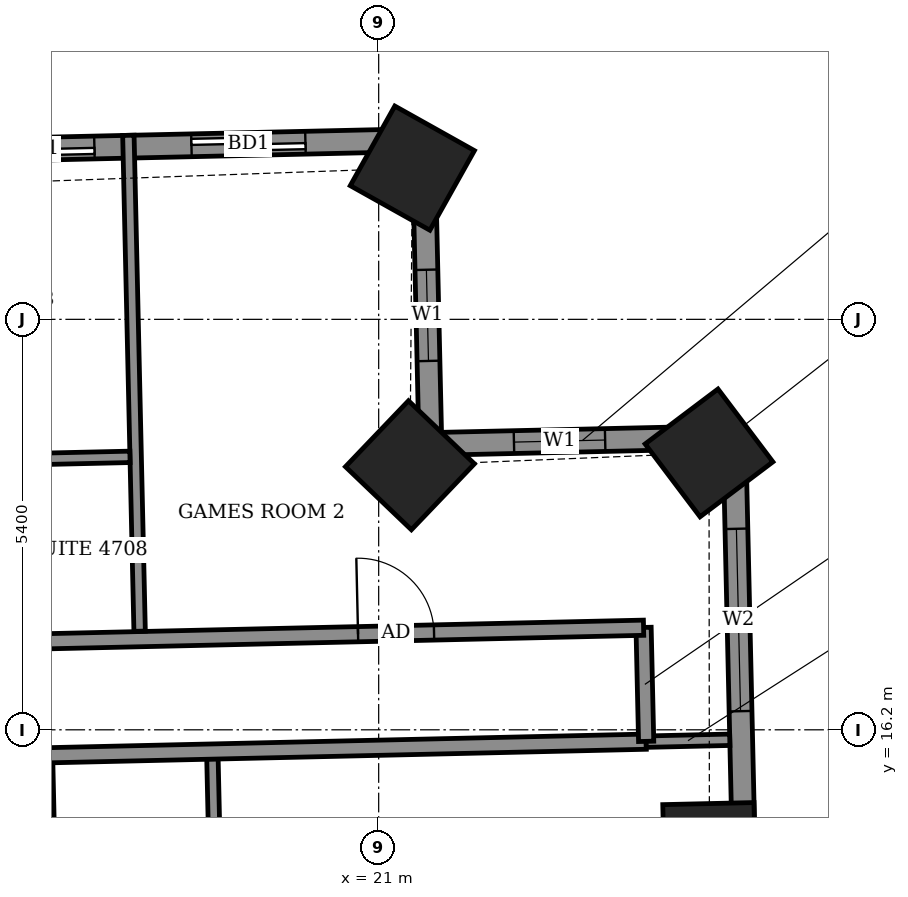
"""IFC4 building model, lengths in metres.
Left out: names, types, materials, properties, quantities, classifications, styles, units other than length and angle.
Written with IfcOpenShell. Run it as: python <this file> out.ifc"""

import sys

from ifc_helpers import new_model, si_unit, direction, frame, frame_2d, origin, origin_2d, place, context, subcontext, project, spatial, rectangle, extrude, element, fill, save


model = new_model("IFC4")
c1 = context("Model", 3, precision=1e-05, world=origin(), true_north=direction((0.0, 1.0)))
c2 = subcontext(c1, "Body", "Model", "MODEL_VIEW")
j1 = project(units=[si_unit("LENGTHUNIT", "METRE"), si_unit("PLANEANGLEUNIT", "RADIAN")], contexts=[c1])
p1 = place(None, origin())
s1 = spatial("IfcSite", under=j1, at=p1, CompositionType="ELEMENT")
p2 = place(p1, origin())
s2 = spatial("IfcBuilding", under=s1, at=p2, CompositionType="ELEMENT")
p3 = place(p2, frame((0.0, 0.0, 186.1)))
s3 = spatial("IfcBuildingStorey", under=s2, at=p3, CompositionType="ELEMENT", Elevation=186.1)
for number, where, z_axis, x_axis in (
    (1, (25.351, 14.629, -0.55), (0.0, 0.0, 1.0), (-0.023, 1.0, 0.0)),
    (2, (25.346, 19.843, -0.55), (0.0, 0.0, 1.0), (-0.602, 0.798, 0.0)),
    (3, (21.411, 19.68, -0.55), (0.0, 0.0, 1.0), (-0.723, 0.691, 0.0)),
    (4, (21.443, 23.589, -0.55), (0.0, 0.0, 1.0), (-0.873, 0.488, 0.0)),
):
    element("IfcColumn", number, at=place(p3, frame(where, z_axis=z_axis, x_axis=x_axis)), inside=s3, PredefinedType="COLUMN", context=c2, shape_type="SweptSolid", body=[
        extrude(rectangle(XDim=1.2, YDim=1.2, at=origin_2d()), origin(), (0.0, 0.0, 1.0), 3.6),
    ])
p4 = place(p3, frame((25.929, 9.025, 0.0), z_axis=(0.0, 0.0, 1.0), x_axis=(-0.022667601583, 0.999743056909, 0.0)))
e5 = element("IfcWall", 5, at=p4, inside=s3, PredefinedType="SOLIDWALL", context=c2, shape_type="SweptSolid", body=[
    extrude(rectangle(XDim=11.029, YDim=0.3, at=frame_2d((5.515, 0.0))), origin(), (0.0, 0.0, 1.0), 3.05),
])
p5 = place(p4, frame((0.833, 0.0, 0.0)))
e6 = element("IfcOpeningElement", 6, at=p5, cuts=e5, PredefinedType="OPENING", context=c2, shape_type="SweptSolid", body=[
    extrude(rectangle(XDim=1.5, YDim=2.4, at=frame_2d((0.75, 1.2))), frame((0.0, 0.16, 0.0), z_axis=(0.0, -1.0, 0.0), x_axis=(1.0, 0.0, 0.0)), (0.0, 0.0, 1.0), 0.32),
])
p6 = place(p4, frame((3.389, 0.0, 0.9)))
e7 = element("IfcOpeningElement", 7, at=p6, cuts=e5, PredefinedType="OPENING", context=c2, shape_type="SweptSolid", body=[
    extrude(rectangle(XDim=1.2, YDim=1.5, at=frame_2d((0.6, 0.75))), frame((0.0, 0.16, 0.0), z_axis=(0.0, -1.0, 0.0), x_axis=(1.0, 0.0, 0.0)), (0.0, 0.0, 1.0), 0.32),
])
p7 = place(p4, frame((7.422, 0.0, 0.9)))
e8 = element("IfcOpeningElement", 8, at=p7, cuts=e5, PredefinedType="OPENING", context=c2, shape_type="SweptSolid", body=[
    extrude(rectangle(XDim=2.4, YDim=1.5, at=frame_2d((1.2, 0.75))), frame((0.0, 0.16, 0.0), z_axis=(0.0, -1.0, 0.0), x_axis=(1.0, 0.0, 0.0)), (0.0, 0.0, 1.0), 0.32),
])
p8 = place(p3, frame((25.679, 20.051, 0.0), z_axis=(0.0, 0.0, 1.0), x_axis=(-0.999740826251, -0.022765770952, 0.0)))
e9 = element("IfcWall", 9, at=p8, inside=s3, PredefinedType="SOLIDWALL", context=c2, shape_type="SweptSolid", body=[
    extrude(rectangle(XDim=4.0, YDim=0.3, at=frame_2d((2.0, 0.0))), origin(), (0.0, 0.0, 1.0), 2.55),
])
p9 = place(p8, frame((1.7, 0.0, 0.9)))
e10 = element("IfcOpeningElement", 10, at=p9, cuts=e9, PredefinedType="OPENING", context=c2, shape_type="SweptSolid", body=[
    extrude(rectangle(XDim=1.2, YDim=1.5, at=frame_2d((0.6, 0.75))), frame((0.0, 0.16, 0.0), z_axis=(0.0, -1.0, 0.0), x_axis=(1.0, 0.0, 0.0)), (0.0, 0.0, 1.0), 0.32),
])
p10 = place(p3, frame((21.68, 19.96, 0.0), z_axis=(0.0, 0.0, 1.0), x_axis=(-0.022704768219, 0.999742213523, 0.0)))
e11 = element("IfcWall", 11, at=p10, inside=s3, PredefinedType="SOLIDWALL", context=c2, shape_type="SweptSolid", body=[
    extrude(rectangle(XDim=4.0, YDim=0.3, at=frame_2d((2.0, 0.0))), origin(), (0.0, 0.0, 1.0), 2.55),
])
p11 = place(p10, frame((1.093, 0.0, 0.9)))
e12 = element("IfcOpeningElement", 12, at=p11, cuts=e11, PredefinedType="OPENING", context=c2, shape_type="SweptSolid", body=[
    extrude(rectangle(XDim=1.2, YDim=1.5, at=frame_2d((0.6, 0.75))), frame((0.0, 0.16, 0.0), z_axis=(0.0, -1.0, 0.0), x_axis=(1.0, 0.0, 0.0)), (0.0, 0.0, 1.0), 0.32),
])
p12 = place(p3, frame((21.589, 23.959, 0.0), z_axis=(0.0, 0.0, 1.0), x_axis=(-0.999742671382, -0.022684598702, 0.0)))
e13 = element("IfcWall", 13, at=p12, inside=s3, PredefinedType="SOLIDWALL", context=c2, shape_type="SweptSolid", body=[
    extrude(rectangle(XDim=40.381, YDim=0.3, at=frame_2d((20.19, 0.0))), origin(), (0.0, 0.0, 1.0), 3.05),
])
p13 = place(p12, frame((1.553, 0.0, 0.0)))
e14 = element("IfcOpeningElement", 14, at=p13, cuts=e13, PredefinedType="OPENING", context=c2, shape_type="SweptSolid", body=[
    extrude(rectangle(XDim=1.5, YDim=2.4, at=frame_2d((0.75, 1.2))), frame((0.0, 0.16, 0.0), z_axis=(0.0, -1.0, 0.0), x_axis=(1.0, 0.0, 0.0)), (0.0, 0.0, 1.0), 0.32),
])
p14 = place(p12, frame((4.33, 0.0, 0.0)))
e15 = element("IfcOpeningElement", 15, at=p14, cuts=e13, PredefinedType="OPENING", context=c2, shape_type="SweptSolid", body=[
    extrude(rectangle(XDim=1.5, YDim=2.4, at=frame_2d((0.75, 1.2))), frame((0.0, 0.16, 0.0), z_axis=(0.0, -1.0, 0.0), x_axis=(1.0, 0.0, 0.0)), (0.0, 0.0, 1.0), 0.32),
])
p15 = place(p12, frame((9.43, 0.0, 0.0)))
e16 = element("IfcOpeningElement", 16, at=p15, cuts=e13, PredefinedType="OPENING", context=c2, shape_type="SweptSolid", body=[
    extrude(rectangle(XDim=1.5, YDim=2.4, at=frame_2d((0.75, 1.2))), frame((0.0, 0.16, 0.0), z_axis=(0.0, -1.0, 0.0), x_axis=(1.0, 0.0, 0.0)), (0.0, 0.0, 1.0), 0.32),
])
p16 = place(p12, frame((14.37, 0.0, 0.0)))
e17 = element("IfcOpeningElement", 17, at=p16, cuts=e13, PredefinedType="OPENING", context=c2, shape_type="SweptSolid", body=[
    extrude(rectangle(XDim=1.5, YDim=2.4, at=frame_2d((0.75, 1.2))), frame((0.0, 0.16, 0.0), z_axis=(0.0, -1.0, 0.0), x_axis=(1.0, 0.0, 0.0)), (0.0, 0.0, 1.0), 0.32),
])
p17 = place(p12, frame((17.41, 0.0, 0.0)))
e18 = element("IfcOpeningElement", 18, at=p17, cuts=e13, PredefinedType="OPENING", context=c2, shape_type="SweptSolid", body=[
    extrude(rectangle(XDim=1.5, YDim=2.4, at=frame_2d((0.75, 1.2))), frame((0.0, 0.16, 0.0), z_axis=(0.0, -1.0, 0.0), x_axis=(1.0, 0.0, 0.0)), (0.0, 0.0, 1.0), 0.32),
])
p18 = place(p12, frame((22.03, 0.0, 0.0)))
e19 = element("IfcOpeningElement", 19, at=p18, cuts=e13, PredefinedType="OPENING", context=c2, shape_type="SweptSolid", body=[
    extrude(rectangle(XDim=1.5, YDim=2.4, at=frame_2d((0.75, 1.2))), frame((0.0, 0.16, 0.0), z_axis=(0.0, -1.0, 0.0), x_axis=(1.0, 0.0, 0.0)), (0.0, 0.0, 1.0), 0.32),
])
p19 = place(p12, frame((27.7, 0.0, 0.0)))
e20 = element("IfcOpeningElement", 20, at=p19, cuts=e13, PredefinedType="OPENING", context=c2, shape_type="SweptSolid", body=[
    extrude(rectangle(XDim=1.2, YDim=2.4, at=frame_2d((0.6, 1.2))), frame((0.0, 0.16, 0.0), z_axis=(0.0, -1.0, 0.0), x_axis=(1.0, 0.0, 0.0)), (0.0, 0.0, 1.0), 0.32),
])
p20 = place(p12, frame((30.48, 0.0, 0.0)))
e21 = element("IfcOpeningElement", 21, at=p20, cuts=e13, PredefinedType="OPENING", context=c2, shape_type="SweptSolid", body=[
    extrude(rectangle(XDim=1.5, YDim=2.4, at=frame_2d((0.75, 1.2))), frame((0.0, 0.16, 0.0), z_axis=(0.0, -1.0, 0.0), x_axis=(1.0, 0.0, 0.0)), (0.0, 0.0, 1.0), 0.32),
])
p21 = place(p12, frame((35.065, 0.0, 0.0)))
e22 = element("IfcOpeningElement", 22, at=p21, cuts=e13, PredefinedType="OPENING", context=c2, shape_type="SweptSolid", body=[
    extrude(rectangle(XDim=1.5, YDim=2.4, at=frame_2d((0.75, 1.2))), frame((0.0, 0.16, 0.0), z_axis=(0.0, -1.0, 0.0), x_axis=(1.0, 0.0, 0.0)), (0.0, 0.0, 1.0), 0.32),
])
p22 = place(p12, frame((37.945, 0.0, 0.9)))
e23 = element("IfcOpeningElement", 23, at=p22, cuts=e13, PredefinedType="OPENING", context=c2, shape_type="SweptSolid", body=[
    extrude(rectangle(XDim=1.2, YDim=1.5, at=frame_2d((0.6, 0.75))), frame((0.0, 0.16, 0.0), z_axis=(0.0, -1.0, 0.0), x_axis=(1.0, 0.0, 0.0)), (0.0, 0.0, 1.0), 0.32),
])
p23 = place(p3, frame((16.797, 7.674, 0.0), z_axis=(0.0, 0.0, 1.0), x_axis=(-0.022698399288, 0.999742358145, 0.0)))
e24 = element("IfcWall", 24, at=p23, inside=s3, PredefinedType="PARTITIONING", context=c2, shape_type="SweptSolid", body=[
    extrude(rectangle(XDim=8.196, YDim=0.2, at=frame_2d((4.098, 0.0))), origin(), (0.0, 0.0, 1.0), 3.05),
])
p24 = place(p23, frame((1.539, 0.0, 0.0)))
e25 = element("IfcOpeningElement", 25, at=p24, cuts=e24, PredefinedType="OPENING", context=c2, shape_type="SweptSolid", body=[
    extrude(rectangle(XDim=1.0, YDim=2.1, at=frame_2d((0.5, 1.05))), frame((0.0, 0.11, 0.0), z_axis=(0.0, -1.0, 0.0), x_axis=(1.0, 0.0, 0.0)), (0.0, 0.0, 1.0), 0.22),
])
p25 = place(p23, frame((4.35, 0.0, 0.0)))
e26 = element("IfcOpeningElement", 26, at=p25, cuts=e24, PredefinedType="OPENING", context=c2, shape_type="SweptSolid", body=[
    extrude(rectangle(XDim=1.0, YDim=2.1, at=frame_2d((0.5, 1.05))), frame((0.0, 0.11, 0.0), z_axis=(0.0, -1.0, 0.0), x_axis=(1.0, 0.0, 0.0)), (0.0, 0.0, 1.0), 0.22),
])
p26 = place(p23, frame((6.546, 0.0, 0.0)))
e27 = element("IfcOpeningElement", 27, at=p26, cuts=e24, PredefinedType="OPENING", context=c2, shape_type="SweptSolid", body=[
    extrude(rectangle(XDim=0.9, YDim=2.1, at=frame_2d((0.45, 1.05))), frame((0.0, 0.11, 0.0), z_axis=(0.0, -1.0, 0.0), x_axis=(1.0, 0.0, 0.0)), (0.0, 0.0, 1.0), 0.22),
])
p27 = place(p3, frame((18.865, 13.519, 0.0), z_axis=(0.0, 0.0, 1.0), x_axis=(-0.022612884682, 0.999744296031, 0.0)))
e28 = element("IfcWall", 28, at=p27, inside=s3, PredefinedType="PARTITIONING", context=c2, shape_type="SweptSolid", body=[
    extrude(rectangle(XDim=2.3, YDim=0.15, at=frame_2d((1.15, 0.0))), origin(), (0.0, 0.0, 1.0), 3.05),
])
p28 = place(p3, frame((16.612, 15.864, 0.0), z_axis=(0.0, 0.0, 1.0), x_axis=(0.999741181744, 0.022750154412, 0.0)))
e29 = element("IfcWall", 29, at=p28, inside=s3, PredefinedType="PARTITIONING", context=c2, shape_type="SweptSolid", body=[
    extrude(rectangle(XDim=7.909, YDim=0.2, at=frame_2d((3.955, 0.0))), origin(), (0.0, 0.0, 1.0), 3.05),
])
p29 = place(p3, frame((24.519, 16.044, 0.0), z_axis=(0.0, 0.0, 1.0), x_axis=(0.999738732953, 0.022857511541, 0.0)))
e30 = element("IfcWall", 30, at=p29, inside=s3, PredefinedType="PARTITIONING", context=c2, shape_type="SweptSolid", body=[
    extrude(rectangle(XDim=1.1, YDim=0.15, at=frame_2d((0.55, 0.0))), origin(), (0.0, 0.0, 1.0), 2.55),
])
p30 = place(p3, frame((24.519, 16.048, 0.0), z_axis=(0.0, 0.0, 1.0), x_axis=(-0.022632637625, 0.99974384905, 0.0)))
e31 = element("IfcWall", 31, at=p30, inside=s3, PredefinedType="PARTITIONING", context=c2, shape_type="SweptSolid", body=[
    extrude(rectangle(XDim=1.5, YDim=0.2, at=frame_2d((0.75, 0.0))), origin(), (0.0, 0.0, 1.0), 3.05),
])
p31 = place(p3, frame((14.88, 17.325, 0.0), z_axis=(0.0, 0.0, 1.0), x_axis=(0.999742504166, 0.022691966963, 0.0)))
e32 = element("IfcWall", 32, at=p31, inside=s3, PredefinedType="PARTITIONING", context=c2, shape_type="SweptSolid", body=[
    extrude(rectangle(XDim=9.608, YDim=0.2, at=frame_2d((4.804, 0.0))), origin(), (0.0, 0.0, 1.0), 3.05),
])
p32 = place(p31, frame((5.85, 0.0, 0.0)))
e33 = element("IfcOpeningElement", 33, at=p32, cuts=e32, PredefinedType="OPENING", context=c2, shape_type="SweptSolid", body=[
    extrude(rectangle(XDim=1.0, YDim=2.1, at=frame_2d((0.5, 1.05))), frame((0.0, 0.11, 0.0), z_axis=(0.0, -1.0, 0.0), x_axis=(1.0, 0.0, 0.0)), (0.0, 0.0, 1.0), 0.22),
])
p33 = place(p3, frame((17.855, 17.497, 0.0), z_axis=(0.0, 0.0, 1.0), x_axis=(-0.022672114006, 0.999742954587, 0.0)))
e34 = element("IfcWall", 34, at=p33, inside=s3, PredefinedType="PARTITIONING", context=c2, shape_type="SweptSolid", body=[
    extrude(rectangle(XDim=6.526, YDim=0.15, at=frame_2d((3.263, 0.0))), origin(), (0.0, 0.0, 1.0), 2.55),
])
p34 = place(p3, frame((15.403, 19.738, 0.0), z_axis=(0.0, 0.0, 1.0), x_axis=(0.999740478815, 0.022781023197, 0.0)))
e35 = element("IfcWall", 35, at=p34, inside=s3, PredefinedType="PARTITIONING", context=c2, shape_type="SweptSolid", body=[
    extrude(rectangle(XDim=2.325, YDim=0.15, at=frame_2d((1.163, 0.0))), origin(), (0.0, 0.0, 1.0), 3.05),
])
p35 = place(p7, origin())
e36 = element("IfcWindow", 36, at=p35, inside=s3, PartitioningType="DOUBLE_PANEL_VERTICAL", PredefinedType="WINDOW", context=c2, shape_type="SweptSolid", body=[
    extrude(rectangle(XDim=2.4, YDim=1.5, at=frame_2d((1.2, 0.75))), frame((0.0, 0.03, 0.0), z_axis=(0.0, -1.0, 0.0), x_axis=(1.0, 0.0, 0.0)), (0.0, 0.0, 1.0), 0.06),
])
fill(e8, e36)
p36 = place(p9, origin())
e37 = element("IfcWindow", 37, at=p36, inside=s3, PartitioningType="SINGLE_PANEL", PredefinedType="WINDOW", context=c2, shape_type="SweptSolid", body=[
    extrude(rectangle(XDim=1.2, YDim=1.5, at=frame_2d((0.6, 0.75))), frame((0.0, 0.03, 0.0), z_axis=(0.0, -1.0, 0.0), x_axis=(1.0, 0.0, 0.0)), (0.0, 0.0, 1.0), 0.06),
])
fill(e10, e37)
p37 = place(p11, origin())
e38 = element("IfcWindow", 38, at=p37, inside=s3, PartitioningType="SINGLE_PANEL", PredefinedType="WINDOW", context=c2, shape_type="SweptSolid", body=[
    extrude(rectangle(XDim=1.2, YDim=1.5, at=frame_2d((0.6, 0.75))), frame((0.0, 0.03, 0.0), z_axis=(0.0, -1.0, 0.0), x_axis=(1.0, 0.0, 0.0)), (0.0, 0.0, 1.0), 0.06),
])
fill(e12, e38)
p38 = place(p13, origin())
e39 = element("IfcDoor", 39, at=p38, inside=s3, OperationType="SLIDING_TO_LEFT", PredefinedType="DOOR", context=c2, shape_type="SweptSolid", body=[
    extrude(rectangle(XDim=1.5, YDim=2.4, at=frame_2d((0.75, 1.2))), frame((0.0, 0.025, 0.0), z_axis=(0.0, -1.0, 0.0), x_axis=(1.0, 0.0, 0.0)), (0.0, 0.0, 1.0), 0.05),
])
fill(e14, e39)
p39 = place(p14, origin())
e40 = element("IfcDoor", 40, at=p39, inside=s3, OperationType="SLIDING_TO_LEFT", PredefinedType="DOOR", context=c2, shape_type="SweptSolid", body=[
    extrude(rectangle(XDim=1.5, YDim=2.4, at=frame_2d((0.75, 1.2))), frame((0.0, 0.025, 0.0), z_axis=(0.0, -1.0, 0.0), x_axis=(1.0, 0.0, 0.0)), (0.0, 0.0, 1.0), 0.05),
])
fill(e15, e40)
p40 = place(p32, origin())
e41 = element("IfcDoor", 41, at=p40, inside=s3, OperationType="SINGLE_SWING_RIGHT", PredefinedType="DOOR", context=c2, shape_type="SweptSolid", body=[
    extrude(rectangle(XDim=1.0, YDim=2.1, at=frame_2d((0.5, 1.05))), frame((0.0, 0.025, 0.0), z_axis=(0.0, -1.0, 0.0), x_axis=(1.0, 0.0, 0.0)), (0.0, 0.0, 1.0), 0.05),
])
fill(e33, e41)
save(model, sys.argv[1])
